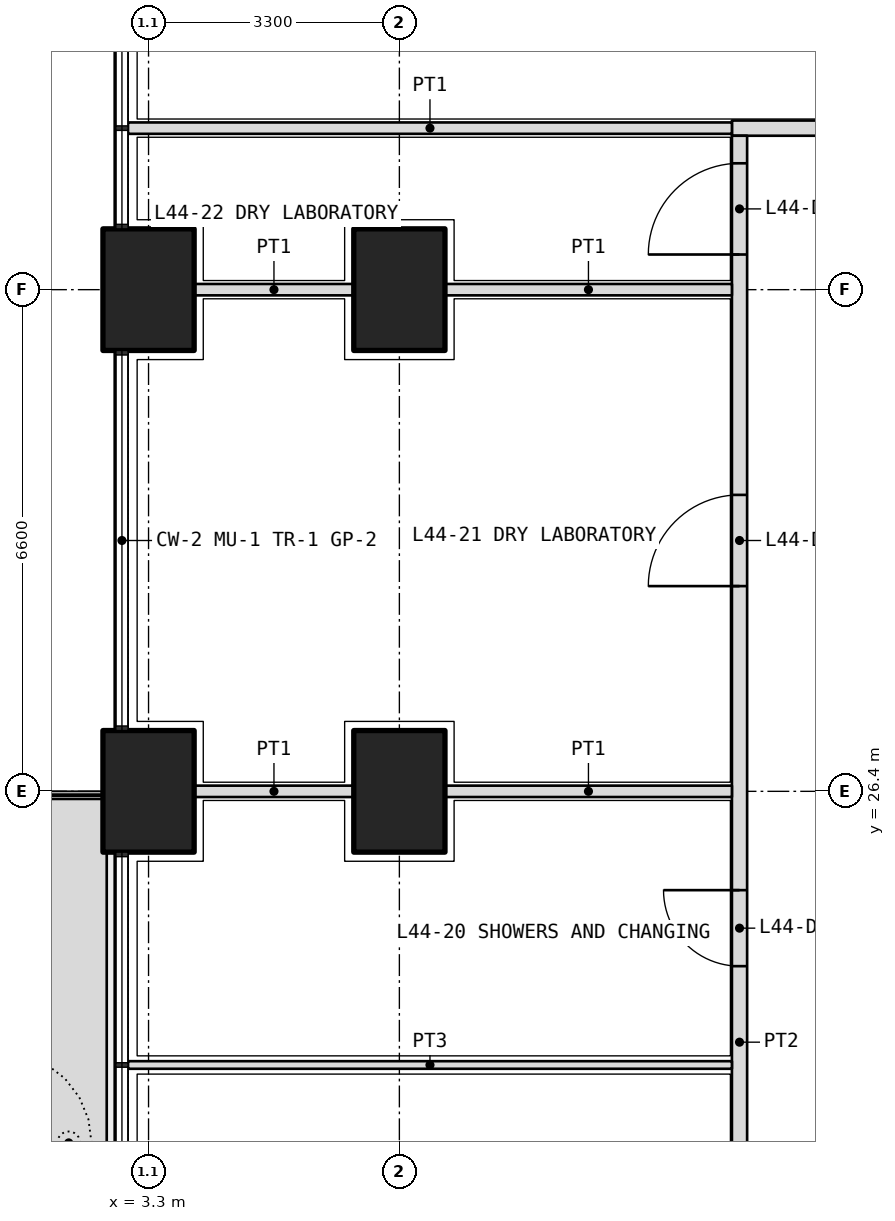
"""IFC4 building model, lengths in metres.
Left out: names, types, materials, properties, quantities, classifications, styles, units other than length and angle.
Written with IfcOpenShell. Run it as: python <this file> out.ifc"""

import sys

from ifc_helpers import new_model, si_unit, direction, frame, frame_2d, origin, origin_2d, place, context, subcontext, project, spatial, polyline, rectangle, outline, extrude, element, fill, save


model = new_model("IFC4")
c1 = context("Model", 3, precision=1e-05, world=origin(), true_north=direction((0.0, 1.0)))
c2 = subcontext(c1, "Body", "Model", "MODEL_VIEW")
j1 = project(units=[si_unit("LENGTHUNIT", "METRE"), si_unit("PLANEANGLEUNIT", "RADIAN")], contexts=[c1])
p1 = place(None, origin())
s1 = spatial("IfcSite", under=j1, at=p1, CompositionType="ELEMENT")
p2 = place(p1, origin())
s2 = spatial("IfcBuilding", under=s1, at=p2, CompositionType="ELEMENT")
p3 = place(p2, frame((0.0, 0.0, 193.5)))
s3 = spatial("IfcBuildingStorey", under=s2, at=p3, CompositionType="ELEMENT", Elevation=193.5)
for number, where, z_axis, x_axis in (
    (1, (3.3, 26.4, 0.0), (0.0, 0.0, 1.0), (0.0, 1.0, 0.0)),
    (2, (3.3, 33.0, 0.0), (0.0, 0.0, 1.0), (0.0, 1.0, 0.0)),
    (3, (6.6, 26.4, 0.0), (0.0, 0.0, 1.0), (0.0, 1.0, 0.0)),
    (4, (6.6, 33.0, 0.0), (0.0, 0.0, 1.0), (0.0, 1.0, 0.0)),
):
    element("IfcColumn", number, at=place(p3, frame(where, z_axis=z_axis, x_axis=x_axis)), inside=s3, PredefinedType="COLUMN", context=c2, shape_type="SweptSolid", body=[
        extrude(rectangle(XDim=1.6, YDim=1.2, at=origin_2d()), origin(), (0.0, 0.0, 1.0), 4.2),
    ])
p4 = place(p3, origin())
e5 = element("IfcWall", 5, at=p4, inside=s3, PredefinedType="USERDEFINED", context=c2, shape_type="SweptSolid", body=[
    extrude(outline(polyline([(1.75, 17.25), (2.75, 17.25), (2.75, 26.3), (1.75, 26.3), (1.75, 17.25)]), holes=[polyline([(1.9, 17.4), (2.6, 17.4), (2.6, 26.15), (1.9, 26.15), (1.9, 17.4)])]), origin(), (0.0, 0.0, 1.0), 1.05),
])
p5 = place(p3, frame((10.975, 35.125, 0.0), z_axis=(0.0, 0.0, 1.0), x_axis=(1.0, 0.0, 0.0)))
e6 = element("IfcWall", 6, at=p5, inside=s3, PredefinedType="PARTITIONING", context=c2, shape_type="SweptSolid", body=[
    extrude(rectangle(XDim=30.85, YDim=0.2, at=frame_2d((15.425, 0.0))), origin(), (0.0, 0.0, 1.0), 2.85),
])
p6 = place(p5, frame((2.212, 0.0, 0.0)))
e7 = element("IfcOpeningElement", 7, at=p6, cuts=e6, PredefinedType="OPENING", context=c2, shape_type="SweptSolid", body=[
    extrude(rectangle(XDim=1.2, YDim=2.1, at=frame_2d((0.6, 1.05))), frame((0.0, 0.11, 0.0), z_axis=(0.0, -1.0, 0.0), x_axis=(1.0, 0.0, 0.0)), (0.0, 0.0, 1.0), 0.22),
])
p7 = place(p5, frame((6.675, 0.0, 0.0)))
e8 = element("IfcOpeningElement", 8, at=p7, cuts=e6, PredefinedType="OPENING", context=c2, shape_type="SweptSolid", body=[
    extrude(rectangle(XDim=1.0, YDim=2.1, at=frame_2d((0.5, 1.05))), frame((0.0, 0.11, 0.0), z_axis=(0.0, -1.0, 0.0), x_axis=(1.0, 0.0, 0.0)), (0.0, 0.0, 1.0), 0.22),
])
p8 = place(p5, frame((14.925, 0.0, 0.0)))
e9 = element("IfcOpeningElement", 9, at=p8, cuts=e6, PredefinedType="OPENING", context=c2, shape_type="SweptSolid", body=[
    extrude(rectangle(XDim=1.0, YDim=2.1, at=frame_2d((0.5, 1.05))), frame((0.0, 0.11, 0.0), z_axis=(0.0, -1.0, 0.0), x_axis=(1.0, 0.0, 0.0)), (0.0, 0.0, 1.0), 0.22),
])
p9 = place(p5, frame((25.788, 0.0, 0.0)))
e10 = element("IfcOpeningElement", 10, at=p9, cuts=e6, PredefinedType="OPENING", context=c2, shape_type="SweptSolid", body=[
    extrude(rectangle(XDim=1.2, YDim=2.1, at=frame_2d((0.6, 1.05))), frame((0.0, 0.11, 0.0), z_axis=(0.0, -1.0, 0.0), x_axis=(1.0, 0.0, 0.0)), (0.0, 0.0, 1.0), 0.22),
])
p10 = place(p3, frame((11.075, 11.175, 0.0), z_axis=(0.0, 0.0, 1.0), x_axis=(0.0, 1.0, 0.0)))
e11 = element("IfcWall", 11, at=p10, inside=s3, PredefinedType="PARTITIONING", context=c2, shape_type="SweptSolid", body=[
    extrude(rectangle(XDim=23.85, YDim=0.2, at=frame_2d((11.925, 0.0))), origin(), (0.0, 0.0, 1.0), 2.85),
])
p11 = place(p10, frame((0.462, 0.0, 0.0)))
e12 = element("IfcOpeningElement", 12, at=p11, cuts=e11, PredefinedType="OPENING", context=c2, shape_type="SweptSolid", body=[
    extrude(rectangle(XDim=1.0, YDim=2.1, at=frame_2d((0.5, 1.05))), frame((0.0, 0.11, 0.0), z_axis=(0.0, -1.0, 0.0), x_axis=(1.0, 0.0, 0.0)), (0.0, 0.0, 1.0), 0.22),
])
p12 = place(p10, frame((3.125, 0.0, 0.0)))
e13 = element("IfcOpeningElement", 13, at=p12, cuts=e11, PredefinedType="OPENING", context=c2, shape_type="SweptSolid", body=[
    extrude(rectangle(XDim=1.0, YDim=2.1, at=frame_2d((0.5, 1.05))), frame((0.0, 0.11, 0.0), z_axis=(0.0, -1.0, 0.0), x_axis=(1.0, 0.0, 0.0)), (0.0, 0.0, 1.0), 0.22),
])
p13 = place(p10, frame((6.475, 0.0, 0.0)))
e14 = element("IfcOpeningElement", 14, at=p13, cuts=e11, PredefinedType="OPENING", context=c2, shape_type="SweptSolid", body=[
    extrude(rectangle(XDim=0.9, YDim=2.1, at=frame_2d((0.45, 1.05))), frame((0.0, 0.11, 0.0), z_axis=(0.0, -1.0, 0.0), x_axis=(1.0, 0.0, 0.0)), (0.0, 0.0, 1.0), 0.22),
])
p14 = place(p10, frame((9.675, 0.0, 0.0)))
e15 = element("IfcOpeningElement", 15, at=p14, cuts=e11, PredefinedType="OPENING", context=c2, shape_type="SweptSolid", body=[
    extrude(rectangle(XDim=0.9, YDim=2.1, at=frame_2d((0.45, 1.05))), frame((0.0, 0.11, 0.0), z_axis=(0.0, -1.0, 0.0), x_axis=(1.0, 0.0, 0.0)), (0.0, 0.0, 1.0), 0.22),
])
p15 = place(p10, frame((12.925, 0.0, 0.0)))
e16 = element("IfcOpeningElement", 16, at=p15, cuts=e11, PredefinedType="OPENING", context=c2, shape_type="SweptSolid", body=[
    extrude(rectangle(XDim=1.0, YDim=2.1, at=frame_2d((0.5, 1.05))), frame((0.0, 0.11, 0.0), z_axis=(0.0, -1.0, 0.0), x_axis=(1.0, 0.0, 0.0)), (0.0, 0.0, 1.0), 0.22),
])
p16 = place(p10, frame((17.925, 0.0, 0.0)))
e17 = element("IfcOpeningElement", 17, at=p16, cuts=e11, PredefinedType="OPENING", context=c2, shape_type="SweptSolid", body=[
    extrude(rectangle(XDim=1.2, YDim=2.1, at=frame_2d((0.6, 1.05))), frame((0.0, 0.11, 0.0), z_axis=(0.0, -1.0, 0.0), x_axis=(1.0, 0.0, 0.0)), (0.0, 0.0, 1.0), 0.22),
])
p17 = place(p10, frame((22.288, 0.0, 0.0)))
e18 = element("IfcOpeningElement", 18, at=p17, cuts=e11, PredefinedType="OPENING", context=c2, shape_type="SweptSolid", body=[
    extrude(rectangle(XDim=1.2, YDim=2.1, at=frame_2d((0.6, 1.05))), frame((0.0, 0.11, 0.0), z_axis=(0.0, -1.0, 0.0), x_axis=(1.0, 0.0, 0.0)), (0.0, 0.0, 1.0), 0.22),
])
p18 = place(p3, frame((3.03, 35.125, 0.0), z_axis=(0.0, 0.0, 1.0), x_axis=(1.0, 0.0, 0.0)))
e19 = element("IfcWall", 19, at=p18, inside=s3, PredefinedType="PARTITIONING", context=c2, shape_type="SweptSolid", body=[
    extrude(rectangle(XDim=7.945, YDim=0.15, at=frame_2d((3.973, 0.0))), origin(), (0.0, 0.0, 1.0), 2.7),
])
p19 = place(p3, frame((3.03, 22.8, 0.0), z_axis=(0.0, 0.0, 1.0), x_axis=(1.0, 0.0, 0.0)))
e20 = element("IfcWall", 20, at=p19, inside=s3, PredefinedType="PARTITIONING", context=c2, shape_type="SweptSolid", body=[
    extrude(rectangle(XDim=7.945, YDim=0.1, at=frame_2d((3.973, 0.0))), origin(), (0.0, 0.0, 1.0), 2.7),
])
p20 = place(p3, frame((3.9, 26.4, 0.0), z_axis=(0.0, 0.0, 1.0), x_axis=(1.0, 0.0, 0.0)))
e21 = element("IfcWall", 21, at=p20, inside=s3, PredefinedType="PARTITIONING", context=c2, shape_type="SweptSolid", body=[
    extrude(rectangle(XDim=2.1, YDim=0.15, at=frame_2d((1.05, 0.0))), origin(), (0.0, 0.0, 1.0), 2.85),
])
p21 = place(p3, frame((7.2, 26.4, 0.0), z_axis=(0.0, 0.0, 1.0), x_axis=(1.0, 0.0, 0.0)))
e22 = element("IfcWall", 22, at=p21, inside=s3, PredefinedType="PARTITIONING", context=c2, shape_type="SweptSolid", body=[
    extrude(rectangle(XDim=3.775, YDim=0.15, at=frame_2d((1.888, 0.0))), origin(), (0.0, 0.0, 1.0), 2.85),
])
p22 = place(p3, frame((3.9, 33.0, 0.0), z_axis=(0.0, 0.0, 1.0), x_axis=(1.0, 0.0, 0.0)))
e23 = element("IfcWall", 23, at=p22, inside=s3, PredefinedType="PARTITIONING", context=c2, shape_type="SweptSolid", body=[
    extrude(rectangle(XDim=2.1, YDim=0.15, at=frame_2d((1.05, 0.0))), origin(), (0.0, 0.0, 1.0), 2.85),
])
p23 = place(p3, frame((7.2, 33.0, 0.0), z_axis=(0.0, 0.0, 1.0), x_axis=(1.0, 0.0, 0.0)))
e24 = element("IfcWall", 24, at=p23, inside=s3, PredefinedType="PARTITIONING", context=c2, shape_type="SweptSolid", body=[
    extrude(rectangle(XDim=3.775, YDim=0.15, at=frame_2d((1.888, 0.0))), origin(), (0.0, 0.0, 1.0), 2.85),
])
p24 = place(p15, origin())
e25 = element("IfcDoor", 25, at=p24, inside=s3, OperationType="SINGLE_SWING_RIGHT", PredefinedType="DOOR", context=c2, shape_type="SweptSolid", body=[
    extrude(rectangle(XDim=1.0, YDim=2.1, at=frame_2d((0.5, 1.05))), frame((0.0, 0.025, 0.0), z_axis=(0.0, -1.0, 0.0), x_axis=(1.0, 0.0, 0.0)), (0.0, 0.0, 1.0), 0.05),
])
fill(e16, e25)
p25 = place(p16, origin())
e26 = element("IfcDoor", 26, at=p25, inside=s3, OperationType="DOUBLE_DOOR_SINGLE_SWING", PredefinedType="DOOR", context=c2, shape_type="SweptSolid", body=[
    extrude(rectangle(XDim=1.2, YDim=2.1, at=frame_2d((0.6, 1.05))), frame((0.0, 0.025, 0.0), z_axis=(0.0, -1.0, 0.0), x_axis=(1.0, 0.0, 0.0)), (0.0, 0.0, 1.0), 0.05),
])
fill(e17, e26)
p26 = place(p17, origin())
e27 = element("IfcDoor", 27, at=p26, inside=s3, OperationType="DOUBLE_DOOR_SINGLE_SWING", PredefinedType="DOOR", context=c2, shape_type="SweptSolid", body=[
    extrude(rectangle(XDim=1.2, YDim=2.1, at=frame_2d((0.6, 1.05))), frame((0.0, 0.025, 0.0), z_axis=(0.0, -1.0, 0.0), x_axis=(1.0, 0.0, 0.0)), (0.0, 0.0, 1.0), 0.05),
])
fill(e18, e27)
save(model, sys.argv[1])
